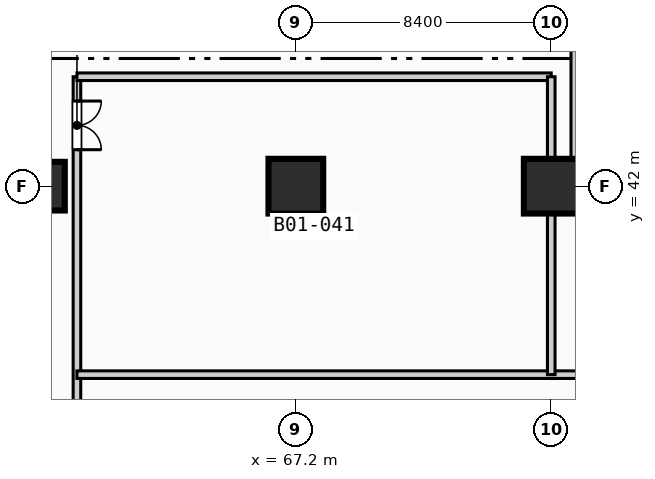
"""IFC4 building model, lengths in metres.
Left out: names, types, materials, properties, quantities, classifications, styles, units other than length and angle.
Written with IfcOpenShell. Run it as: python <this file> out.ifc"""

import sys

from ifc_helpers import new_model, si_unit, direction, frame, frame_2d, origin, origin_2d, place, context, subcontext, project, spatial, rectangle, extrude, element, fill, save


model = new_model("IFC4")
c1 = context("Model", 3, precision=1e-05, world=origin(), true_north=direction((0.0, 1.0)))
c2 = subcontext(c1, "Body", "Model", "MODEL_VIEW")
j1 = project(units=[si_unit("LENGTHUNIT", "METRE"), si_unit("PLANEANGLEUNIT", "RADIAN")], contexts=[c1])
p1 = place(None, origin())
s1 = spatial("IfcSite", under=j1, at=p1, CompositionType="ELEMENT")
p2 = place(p1, origin())
s2 = spatial("IfcBuilding", under=s1, at=p2, CompositionType="ELEMENT")
p3 = place(p2, frame((0.0, 0.0, -4.2)))
s3 = spatial("IfcBuildingStorey", under=s2, at=p3, CompositionType="ELEMENT", Elevation=-4.2)
p4 = place(p3, frame((58.8, 42.0, 0.0), z_axis=(0.0, 0.0, 1.0), x_axis=(1.0, 0.0, 0.0)))
e1 = element("IfcColumn", 1, at=p4, inside=s3, PredefinedType="COLUMN", context=c2, shape_type="SweptSolid", body=[
    extrude(rectangle(XDim=1.6, YDim=1.6, at=origin_2d()), origin(), (0.0, 0.0, 1.0), 4.2),
])
for number, where, z_axis, x_axis in (
    (2, (67.2, 42.0, 0.0), (0.0, 0.0, 1.0), (1.0, 0.0, 0.0)),
    (3, (75.6, 42.0, 0.0), (0.0, 0.0, 1.0), (1.0, 0.0, 0.0)),
):
    element("IfcColumn", number, at=place(p3, frame(where, z_axis=z_axis, x_axis=x_axis)), inside=s3, PredefinedType="COLUMN", context=c2, shape_type="SweptSolid", body=[
        extrude(rectangle(XDim=1.8, YDim=1.8, at=origin_2d()), origin(), (0.0, 0.0, 1.0), 4.2),
    ])
p5 = place(p3, frame((76.375, 42.35, 0.0), z_axis=(0.0, 0.0, 1.0), x_axis=(0.0, 1.0, 0.0)))
e4 = element("IfcWall", 4, at=p5, inside=s3, PredefinedType="SOLIDWALL", context=c2, shape_type="SweptSolid", body=[
    extrude(rectangle(XDim=33.85, YDim=0.25, at=frame_2d((16.925, 0.0))), origin(), (0.0, 0.0, 1.0), 1.2),
])
p6 = place(p3, frame((76.25, 42.475, 0.0), z_axis=(0.0, 0.0, 1.0), x_axis=(1.0, 0.0, 0.0)))
e5 = element("IfcWall", 5, at=p6, inside=s3, PredefinedType="SOLIDWALL", context=c2, shape_type="SweptSolid", body=[
    extrude(rectangle(XDim=7.1, YDim=0.25, at=frame_2d((3.55, 0.0))), origin(), (0.0, 0.0, 1.0), 1.2),
])
p7 = place(p3, frame((60.0, 26.0, 0.0), z_axis=(0.0, 0.0, 1.0), x_axis=(0.0, 1.0, 0.0)))
e6 = element("IfcWall", 6, at=p7, inside=s3, PredefinedType="SOLIDWALL", context=c2, shape_type="SweptSolid", body=[
    extrude(rectangle(XDim=19.6, YDim=0.25, at=frame_2d((9.8, 0.0))), origin(), (0.0, 0.0, 1.0), 3.85),
])
p8 = place(p7, frame((2.4, 0.0, 0.0)))
e7 = element("IfcOpeningElement", 7, at=p8, cuts=e6, PredefinedType="OPENING", context=c2, shape_type="SweptSolid", body=[
    extrude(rectangle(XDim=1.6, YDim=2.2, at=frame_2d((0.8, 1.1))), frame((0.0, 0.135, 0.0), z_axis=(0.0, -1.0, 0.0), x_axis=(1.0, 0.0, 0.0)), (0.0, 0.0, 1.0), 0.27),
])
p9 = place(p7, frame((17.2, 0.0, 0.0)))
e8 = element("IfcOpeningElement", 8, at=p9, cuts=e6, PredefinedType="OPENING", context=c2, shape_type="SweptSolid", body=[
    extrude(rectangle(XDim=1.6, YDim=2.2, at=frame_2d((0.8, 1.1))), frame((0.0, 0.135, 0.0), z_axis=(0.0, -1.0, 0.0), x_axis=(1.0, 0.0, 0.0)), (0.0, 0.0, 1.0), 0.27),
])
p10 = place(p3, frame((60.0, 35.8, 0.0), z_axis=(0.0, 0.0, 1.0), x_axis=(1.0, 0.0, 0.0)))
e9 = element("IfcWall", 9, at=p10, inside=s3, PredefinedType="SOLIDWALL", context=c2, shape_type="SweptSolid", body=[
    extrude(rectangle(XDim=31.6, YDim=0.25, at=frame_2d((15.8, 0.0))), origin(), (0.0, 0.0, 1.0), 3.85),
])
p11 = place(p3, frame((60.0, 45.6, 0.0), z_axis=(0.0, 0.0, 1.0), x_axis=(1.0, 0.0, 0.0)))
e10 = element("IfcWall", 10, at=p11, inside=s3, PredefinedType="SOLIDWALL", context=c2, shape_type="SweptSolid", body=[
    extrude(rectangle(XDim=15.6, YDim=0.25, at=frame_2d((7.8, 0.0))), origin(), (0.0, 0.0, 1.0), 3.85),
])
p12 = place(p3, frame((75.6, 35.8, 0.0), z_axis=(0.0, 0.0, 1.0), x_axis=(0.0, 1.0, 0.0)))
e11 = element("IfcWall", 11, at=p12, inside=s3, PredefinedType="SOLIDWALL", context=c2, shape_type="SweptSolid", body=[
    extrude(rectangle(XDim=9.8, YDim=0.25, at=frame_2d((4.9, 0.0))), origin(), (0.0, 0.0, 1.0), 2.72),
])
p13 = place(p9, origin())
e12 = element("IfcDoor", 12, at=p13, inside=s3, OperationType="SINGLE_SWING_RIGHT", PredefinedType="DOOR", context=c2, shape_type="SweptSolid", body=[
    extrude(rectangle(XDim=1.6, YDim=2.2, at=frame_2d((0.8, 1.1))), frame((0.0, 0.025, 0.0), z_axis=(0.0, -1.0, 0.0), x_axis=(1.0, 0.0, 0.0)), (0.0, 0.0, 1.0), 0.05),
])
fill(e8, e12)
save(model, sys.argv[1])
